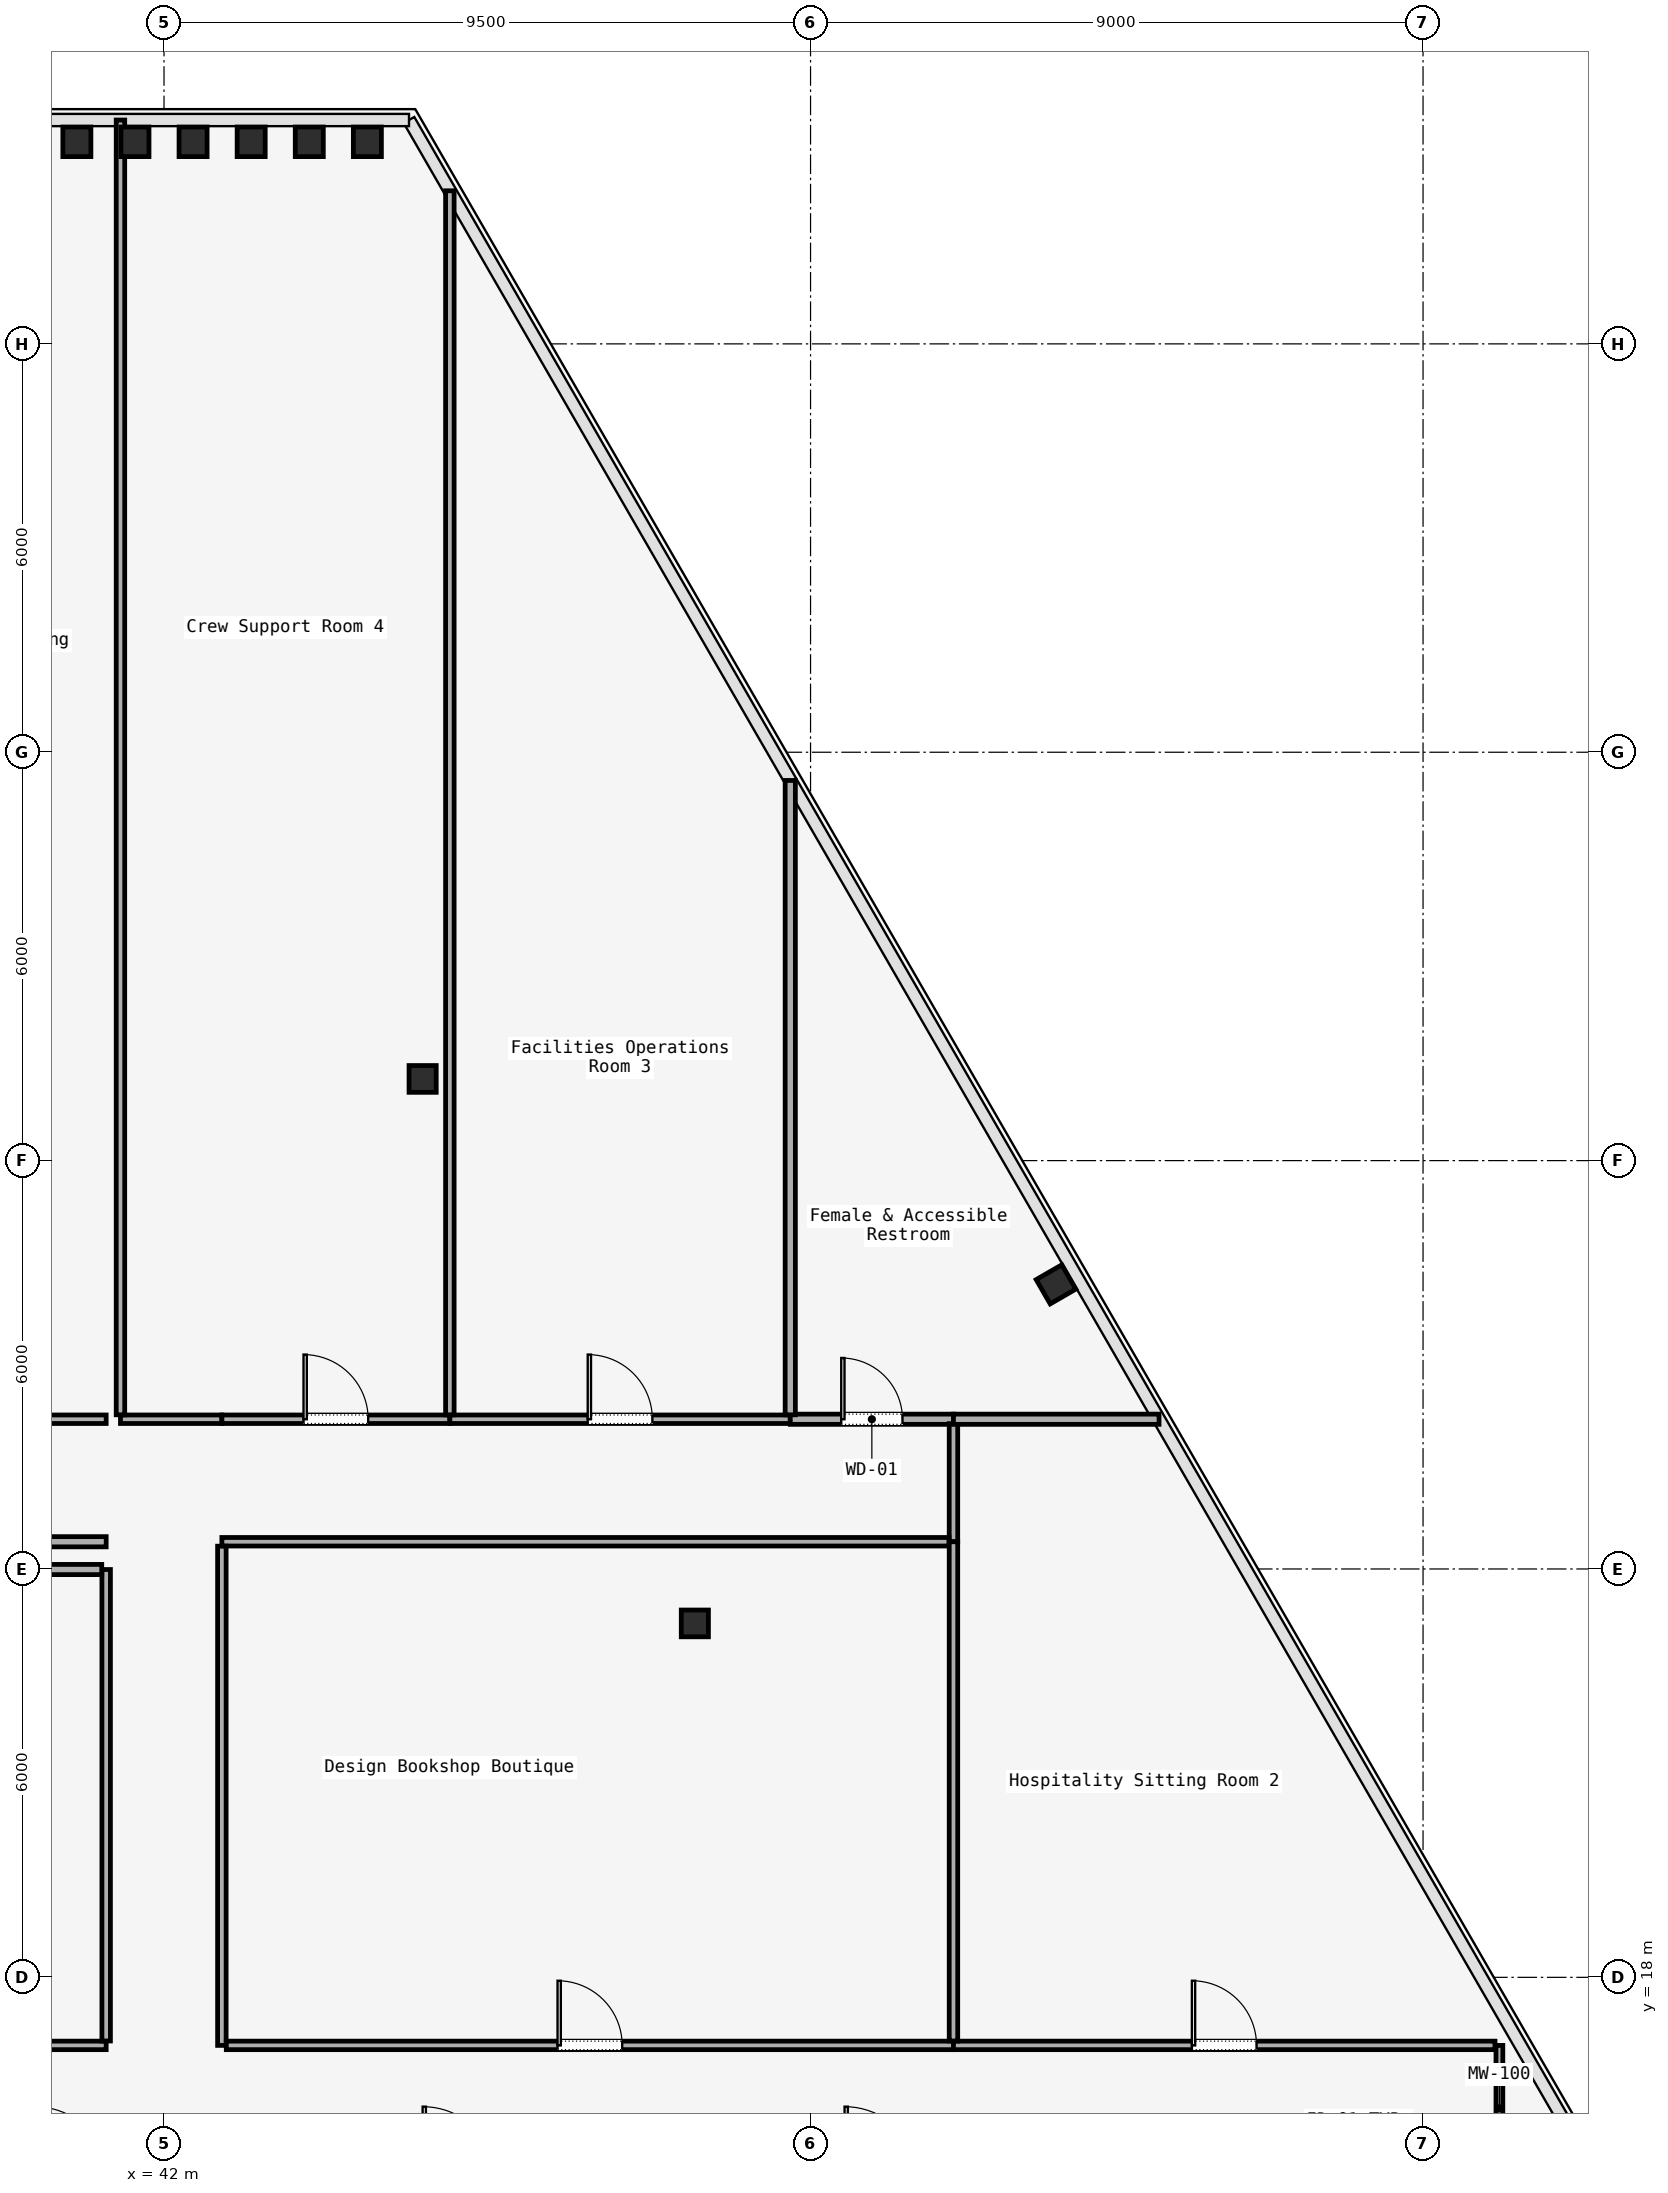
"""IFC4 building model, lengths in metres.
Left out: names, types, materials, properties, quantities, classifications, styles, units other than length and angle.
Written with IfcOpenShell. Run it as: python <this file> out.ifc"""

import sys

from ifc_helpers import new_model, si_unit, direction, frame, frame_2d, origin, origin_2d, place, context, subcontext, project, spatial, rectangle, i_section, extrude, element, fill, save


model = new_model("IFC4")
c1 = context("Model", 3, precision=1e-05, world=origin(), true_north=direction((0.0, 1.0)))
c2 = subcontext(c1, "Body", "Model", "MODEL_VIEW")
j1 = project(units=[si_unit("LENGTHUNIT", "METRE"), si_unit("PLANEANGLEUNIT", "RADIAN")], contexts=[c1])
p1 = place(None, origin())
s1 = spatial("IfcSite", under=j1, at=p1, CompositionType="ELEMENT")
p2 = place(p1, origin())
s2 = spatial("IfcBuilding", under=s1, at=p2, CompositionType="ELEMENT")
p3 = place(p2, frame((0.0, 0.0, 229.4)))
s3 = spatial("IfcBuildingStorey", under=s2, at=p3, CompositionType="ELEMENT", Elevation=229.4)
for number, where, z_axis, x_axis in (
    (1, (49.8, 23.2, 0.0), (0.0, 0.0, 1.0), (1.0, 0.0, 0.0)),
    (2, (45.8, 31.2, 0.0), (0.0, 0.0, 1.0), (1.0, 0.0, 0.0)),
):
    element("IfcColumn", number, at=place(p3, frame(where, z_axis=z_axis, x_axis=x_axis)), inside=s3, PredefinedType="COLUMN", context=c2, shape_type="SweptSolid", body=[
        extrude(i_section(OverallWidth=0.399, OverallDepth=0.394, WebThickness=0.023, FlangeThickness=0.037, FilletRadius=0.015, at=origin_2d()), origin(), (0.0, 0.0, 1.0), 3.58),
    ])
for number, where, z_axis, x_axis in (
    (3, (55.107, 28.182, 0.0), (0.0, 0.0, 1.0), (-0.5, 0.866, 0.0)),
    (4, (44.988, 44.969, 0.0), (0.0, 0.0, 1.0), (1.0, 0.0, 0.0)),
    (5, (44.135, 44.969, 0.0), (0.0, 0.0, 1.0), (1.0, 0.0, 0.0)),
    (6, (43.281, 44.969, 0.0), (0.0, 0.0, 1.0), (1.0, 0.0, 0.0)),
    (7, (42.427, 44.969, 0.0), (0.0, 0.0, 1.0), (1.0, 0.0, 0.0)),
    (8, (41.573, 44.969, 0.0), (0.0, 0.0, 1.0), (1.0, 0.0, 0.0)),
    (9, (40.719, 44.969, 0.0), (0.0, 0.0, 1.0), (1.0, 0.0, 0.0)),
):
    element("IfcColumn", number, at=place(p3, frame(where, z_axis=z_axis, x_axis=x_axis)), inside=s3, PredefinedType="COLUMN", context=c2, shape_type="SweptSolid", body=[
        extrude(i_section(OverallWidth=0.412, OverallDepth=0.435, WebThickness=0.036, FlangeThickness=0.044, FilletRadius=0.015, at=origin_2d()), origin(), (0.0, 0.0, 1.0), 3.58),
    ])
p4 = place(p3, frame((61.622, 17.0, 0.0), z_axis=(0.0, 0.0, 1.0), x_axis=(0.0, -1.0, 0.0)))
e10 = element("IfcWall", 10, at=p4, inside=s3, PredefinedType="MOVABLE", context=c2, shape_type="SweptSolid", body=[
    extrude(rectangle(XDim=1.85, YDim=0.1, at=frame_2d((0.925, 0.0))), origin(), (0.0, 0.0, 1.0), 3.01),
])
p5 = place(p3, frame((30.8, 17.0, 0.0), z_axis=(0.0, 0.0, 1.0), x_axis=(1.0, 0.0, 0.0)))
e11 = element("IfcWall", 11, at=p5, inside=s3, PredefinedType="PARTITIONING", context=c2, shape_type="SweptSolid", body=[
    extrude(rectangle(XDim=10.35, YDim=0.125, at=frame_2d((5.175, 0.0))), origin(), (0.0, 0.0, 1.0), 3.01),
])
p6 = place(p5, frame((4.7, 0.0, 0.0)))
e12 = element("IfcOpeningElement", 12, at=p6, cuts=e11, PredefinedType="OPENING", context=c2, shape_type="SweptSolid", body=[
    extrude(rectangle(XDim=0.95, YDim=2.2, at=frame_2d((0.475, 1.1))), frame((0.0, 0.062, 0.0), z_axis=(0.0, -1.0, 0.0), x_axis=(1.0, 0.0, 0.0)), (0.0, 0.0, 1.0), 0.125),
])
p7 = place(p3, frame((41.15, 17.065, 0.0), z_axis=(0.0, 0.0, 1.0), x_axis=(0.0, 1.0, 0.0)))
e13 = element("IfcWall", 13, at=p7, inside=s3, PredefinedType="PARTITIONING", context=c2, shape_type="SweptSolid", body=[
    extrude(rectangle(XDim=6.927, YDim=0.125, at=frame_2d((3.463, 0.0))), origin(), (0.0, 0.0, 1.0), 3.01),
])
p8 = place(p3, frame((41.15, 24.4, 0.0), z_axis=(0.0, 0.0, 1.0), x_axis=(-1.0, 0.0, 0.0)))
e14 = element("IfcWall", 14, at=p8, inside=s3, PredefinedType="PARTITIONING", context=c2, shape_type="SweptSolid", body=[
    extrude(rectangle(XDim=5.65, YDim=0.15, at=frame_2d((2.825, 0.0))), origin(), (0.0, 0.0, 1.0), 3.01),
])
p9 = place(p3, frame((37.4, 26.2, 0.0), z_axis=(0.0, 0.0, 1.0), x_axis=(1.0, 0.0, 0.0)))
e15 = element("IfcWall", 15, at=p9, inside=s3, PredefinedType="PARTITIONING", context=c2, shape_type="SweptSolid", body=[
    extrude(rectangle(XDim=3.75, YDim=0.125, at=frame_2d((1.875, 0.0))), origin(), (0.0, 0.0, 1.0), 3.01),
])
p10 = place(p9, frame((1.175, 0.0, 0.0)))
e16 = element("IfcOpeningElement", 16, at=p10, cuts=e15, PredefinedType="OPENING", context=c2, shape_type="SweptSolid", body=[
    extrude(rectangle(XDim=1.4, YDim=2.2, at=frame_2d((0.7, 1.1))), frame((0.0, 0.062, 0.0), z_axis=(0.0, -1.0, 0.0), x_axis=(1.0, 0.0, 0.0)), (0.0, 0.0, 1.0), 0.125),
])
p11 = place(p3, frame((41.36, 26.2, 0.0), z_axis=(0.0, 0.0, 1.0), x_axis=(1.0, 0.0, 0.0)))
e17 = element("IfcWall", 17, at=p11, inside=s3, PredefinedType="PARTITIONING", context=c2, shape_type="SweptSolid", body=[
    extrude(rectangle(XDim=1.49, YDim=0.125, at=frame_2d((0.745, 0.0))), origin(), (0.0, 0.0, 1.0), 3.01),
])
p12 = place(p3, frame((42.85, 26.2, 0.0), z_axis=(0.0, 0.0, 1.0), x_axis=(1.0, 0.0, 0.0)))
e18 = element("IfcWall", 18, at=p12, inside=s3, PredefinedType="PARTITIONING", context=c2, shape_type="SweptSolid", body=[
    extrude(rectangle(XDim=3.35, YDim=0.125, at=frame_2d((1.675, 0.0))), origin(), (0.0, 0.0, 1.0), 3.01),
])
p13 = place(p12, frame((1.2, 0.0, 0.0)))
e19 = element("IfcOpeningElement", 19, at=p13, cuts=e18, PredefinedType="OPENING", context=c2, shape_type="SweptSolid", body=[
    extrude(rectangle(XDim=0.95, YDim=2.2, at=frame_2d((0.475, 1.1))), frame((0.0, 0.062, 0.0), z_axis=(0.0, -1.0, 0.0), x_axis=(1.0, 0.0, 0.0)), (0.0, 0.0, 1.0), 0.125),
])
p14 = place(p3, frame((46.2, 26.2, 0.0), z_axis=(0.0, 0.0, 1.0), x_axis=(1.0, 0.0, 0.0)))
e20 = element("IfcWall", 20, at=p14, inside=s3, PredefinedType="PARTITIONING", context=c2, shape_type="SweptSolid", body=[
    extrude(rectangle(XDim=5.002, YDim=0.125, at=frame_2d((2.501, 0.0))), origin(), (0.0, 0.0, 1.0), 3.01),
])
p15 = place(p14, frame((2.026, 0.0, 0.0)))
e21 = element("IfcOpeningElement", 21, at=p15, cuts=e20, PredefinedType="OPENING", context=c2, shape_type="SweptSolid", body=[
    extrude(rectangle(XDim=0.95, YDim=2.2, at=frame_2d((0.475, 1.1))), frame((0.0, 0.062, 0.0), z_axis=(0.0, -1.0, 0.0), x_axis=(1.0, 0.0, 0.0)), (0.0, 0.0, 1.0), 0.125),
])
p16 = place(p3, frame((51.202, 26.2, 0.0), z_axis=(0.0, 0.0, 1.0), x_axis=(1.0, 0.0, 0.0)))
e22 = element("IfcWall", 22, at=p16, inside=s3, PredefinedType="PARTITIONING", context=c2, shape_type="SweptSolid", body=[
    extrude(rectangle(XDim=2.398, YDim=0.15, at=frame_2d((1.199, 0.0))), origin(), (0.0, 0.0, 1.0), 3.01),
])
p17 = place(p16, frame((0.749, 0.0, 0.0)))
e23 = element("IfcOpeningElement", 23, at=p17, cuts=e22, PredefinedType="OPENING", context=c2, shape_type="SweptSolid", body=[
    extrude(rectangle(XDim=0.9, YDim=2.15, at=frame_2d((0.45, 1.075))), frame((0.0, 0.075, 0.0), z_axis=(0.0, -1.0, 0.0), x_axis=(1.0, 0.0, 0.0)), (0.0, 0.0, 1.0), 0.15),
])
p18 = place(p3, frame((53.6, 26.135, 0.0), z_axis=(0.0, 0.0, 1.0), x_axis=(0.0, -1.0, 0.0)))
e24 = element("IfcWall", 24, at=p18, inside=s3, PredefinedType="PARTITIONING", context=c2, shape_type="SweptSolid", body=[
    extrude(rectangle(XDim=1.735, YDim=0.125, at=frame_2d((0.868, 0.0))), origin(), (0.0, 0.0, 1.0), 3.01),
])
p19 = place(p3, frame((53.535, 24.4, 0.0), z_axis=(0.0, 0.0, 1.0), x_axis=(-1.0, 0.0, 0.0)))
e25 = element("IfcWall", 25, at=p19, inside=s3, PredefinedType="PARTITIONING", context=c2, shape_type="SweptSolid", body=[
    extrude(rectangle(XDim=10.685, YDim=0.125, at=frame_2d((5.342, 0.0))), origin(), (0.0, 0.0, 1.0), 3.01),
])
p20 = place(p3, frame((42.85, 24.335, 0.0), z_axis=(0.0, 0.0, 1.0), x_axis=(0.0, -1.0, 0.0)))
e26 = element("IfcWall", 26, at=p20, inside=s3, PredefinedType="PARTITIONING", context=c2, shape_type="SweptSolid", body=[
    extrude(rectangle(XDim=7.335, YDim=0.125, at=frame_2d((3.667, 0.0))), origin(), (0.0, 0.0, 1.0), 3.01),
])
p21 = place(p3, frame((42.915, 17.0, 0.0), z_axis=(0.0, 0.0, 1.0), x_axis=(1.0, 0.0, 0.0)))
e27 = element("IfcWall", 27, at=p21, inside=s3, PredefinedType="PARTITIONING", context=c2, shape_type="SweptSolid", body=[
    extrude(rectangle(XDim=10.685, YDim=0.125, at=frame_2d((5.343, 0.0))), origin(), (0.0, 0.0, 1.0), 3.01),
])
p22 = place(p21, frame((4.867, 0.0, 0.0)))
e28 = element("IfcOpeningElement", 28, at=p22, cuts=e27, PredefinedType="OPENING", context=c2, shape_type="SweptSolid", body=[
    extrude(rectangle(XDim=0.95, YDim=2.2, at=frame_2d((0.475, 1.1))), frame((0.0, 0.062, 0.0), z_axis=(0.0, -1.0, 0.0), x_axis=(1.0, 0.0, 0.0)), (0.0, 0.0, 1.0), 0.125),
])
p23 = place(p3, frame((53.6, 17.0, 0.0), z_axis=(0.0, 0.0, 1.0), x_axis=(1.0, 0.0, 0.0)))
e29 = element("IfcWall", 29, at=p23, inside=s3, PredefinedType="PARTITIONING", context=c2, shape_type="SweptSolid", body=[
    extrude(rectangle(XDim=7.957, YDim=0.125, at=frame_2d((3.979, 0.0))), origin(), (0.0, 0.0, 1.0), 3.01),
])
p24 = place(p23, frame((3.503, 0.0, 0.0)))
e30 = element("IfcOpeningElement", 30, at=p24, cuts=e29, PredefinedType="OPENING", context=c2, shape_type="SweptSolid", body=[
    extrude(rectangle(XDim=0.95, YDim=2.2, at=frame_2d((0.475, 1.1))), frame((0.0, 0.062, 0.0), z_axis=(0.0, -1.0, 0.0), x_axis=(1.0, 0.0, 0.0)), (0.0, 0.0, 1.0), 0.125),
])
p25 = place(p3, frame((30.865, 23.992, 0.0), z_axis=(0.0, 0.0, 1.0), x_axis=(1.0, 0.0, 0.0)))
e31 = element("IfcWall", 31, at=p25, inside=s3, PredefinedType="PARTITIONING", context=c2, shape_type="SweptSolid", body=[
    extrude(rectangle(XDim=10.22, YDim=0.15, at=frame_2d((5.11, 0.0))), origin(), (0.0, 0.0, 1.0), 3.01),
])
p26 = place(p3, frame((53.6, 24.4, 0.0), z_axis=(0.0, 0.0, 1.0), x_axis=(0.0, -1.0, 0.0)))
e32 = element("IfcWall", 32, at=p26, inside=s3, PredefinedType="PARTITIONING", context=c2, shape_type="SweptSolid", body=[
    extrude(rectangle(XDim=7.335, YDim=0.125, at=frame_2d((3.667, 0.0))), origin(), (0.0, 0.0, 1.0), 3.01),
])
p27 = place(p3, frame((53.6, 26.2, 0.0), z_axis=(0.0, 0.0, 1.0), x_axis=(1.0, 0.0, 0.0)))
e33 = element("IfcWall", 33, at=p27, inside=s3, PredefinedType="PARTITIONING", context=c2, shape_type="SweptSolid", body=[
    extrude(rectangle(XDim=3.021, YDim=0.15, at=frame_2d((1.51, 0.0))), origin(), (0.0, 0.0, 1.0), 3.01),
])
p28 = place(p3, frame((51.202, 26.265, 0.0), z_axis=(0.0, 0.0, 1.0), x_axis=(0.0, 1.0, 0.0)))
e34 = element("IfcWall", 34, at=p28, inside=s3, PredefinedType="PARTITIONING", context=c2, shape_type="SweptSolid", body=[
    extrude(rectangle(XDim=9.321, YDim=0.15, at=frame_2d((4.66, 0.0))), origin(), (0.0, 0.0, 1.0), 3.01),
])
p29 = place(p3, frame((46.2, 26.265, 0.0), z_axis=(0.0, 0.0, 1.0), x_axis=(0.0, 1.0, 0.0)))
e35 = element("IfcWall", 35, at=p29, inside=s3, PredefinedType="PARTITIONING", context=c2, shape_type="SweptSolid", body=[
    extrude(rectangle(XDim=17.984, YDim=0.125, at=frame_2d((8.992, 0.0))), origin(), (0.0, 0.0, 1.0), 3.01),
])
p30 = place(p3, frame((41.36, 45.289, 0.0), z_axis=(0.0, 0.0, 1.0), x_axis=(0.0, -1.0, 0.0)))
e36 = element("IfcWall", 36, at=p30, inside=s3, PredefinedType="PARTITIONING", context=c2, shape_type="SweptSolid", body=[
    extrude(rectangle(XDim=19.024, YDim=0.125, at=frame_2d((9.512, 0.0))), origin(), (0.0, 0.0, 1.0), 3.01),
])
p31 = place(p22, origin())
e37 = element("IfcDoor", 37, at=p31, inside=s3, OperationType="SINGLE_SWING_LEFT", PredefinedType="DOOR", context=c2, shape_type="SweptSolid", body=[
    extrude(rectangle(XDim=0.95, YDim=2.2, at=frame_2d((0.475, 1.1))), frame((0.0, 0.025, 0.0), z_axis=(0.0, -1.0, 0.0), x_axis=(1.0, 0.0, 0.0)), (0.0, 0.0, 1.0), 0.05),
])
fill(e28, e37)
p32 = place(p24, origin())
e38 = element("IfcDoor", 38, at=p32, inside=s3, OperationType="SINGLE_SWING_RIGHT", PredefinedType="DOOR", context=c2, shape_type="SweptSolid", body=[
    extrude(rectangle(XDim=0.95, YDim=2.2, at=frame_2d((0.475, 1.1))), frame((0.0, 0.025, 0.0), z_axis=(0.0, -1.0, 0.0), x_axis=(1.0, 0.0, 0.0)), (0.0, 0.0, 1.0), 0.05),
])
fill(e30, e38)
p33 = place(p17, origin())
e39 = element("IfcDoor", 39, at=p33, inside=s3, OperationType="SINGLE_SWING_LEFT", PredefinedType="DOOR", context=c2, shape_type="SweptSolid", body=[
    extrude(rectangle(XDim=0.9, YDim=2.15, at=frame_2d((0.45, 1.075))), frame((0.0, 0.025, 0.0), z_axis=(0.0, -1.0, 0.0), x_axis=(1.0, 0.0, 0.0)), (0.0, 0.0, 1.0), 0.05),
])
fill(e23, e39)
p34 = place(p15, origin())
e40 = element("IfcDoor", 40, at=p34, inside=s3, OperationType="SINGLE_SWING_LEFT", PredefinedType="DOOR", context=c2, shape_type="SweptSolid", body=[
    extrude(rectangle(XDim=0.95, YDim=2.2, at=frame_2d((0.475, 1.1))), frame((0.0, 0.025, 0.0), z_axis=(0.0, -1.0, 0.0), x_axis=(1.0, 0.0, 0.0)), (0.0, 0.0, 1.0), 0.05),
])
fill(e21, e40)
p35 = place(p13, origin())
e41 = element("IfcDoor", 41, at=p35, inside=s3, OperationType="SINGLE_SWING_LEFT", PredefinedType="DOOR", context=c2, shape_type="SweptSolid", body=[
    extrude(rectangle(XDim=0.95, YDim=2.2, at=frame_2d((0.475, 1.1))), frame((0.0, 0.025, 0.0), z_axis=(0.0, -1.0, 0.0), x_axis=(1.0, 0.0, 0.0)), (0.0, 0.0, 1.0), 0.05),
])
fill(e19, e41)
save(model, sys.argv[1])
